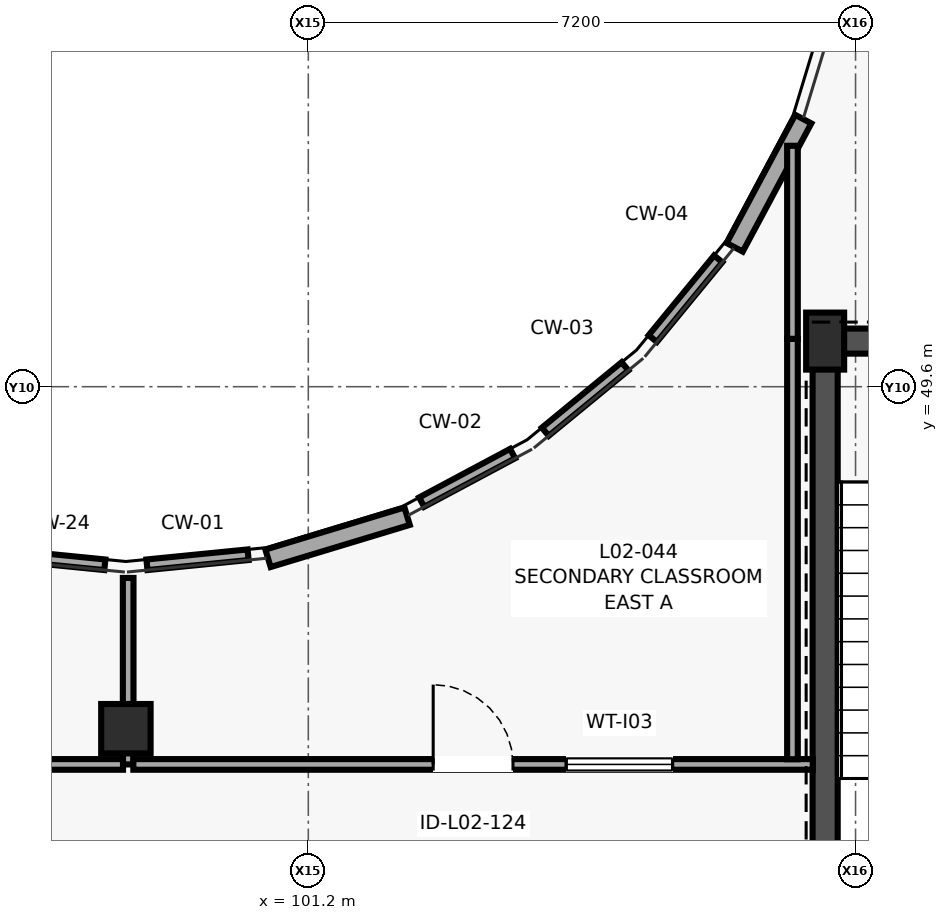
"""IFC4 building model, lengths in metres.
Left out: names, types, materials, properties, quantities, classifications, styles, units other than length and angle.
Written with IfcOpenShell. Run it as: python <this file> out.ifc"""

import sys

from ifc_helpers import new_model, si_unit, direction, frame, frame_2d, origin, origin_2d, place, context, subcontext, project, spatial, rectangle, circle, extrude, element, fill, save


model = new_model("IFC4")
c1 = context("Model", 3, precision=1e-05, world=origin(), true_north=direction((0.0, 1.0)))
c2 = subcontext(c1, "Body", "Model", "MODEL_VIEW")
j1 = project(units=[si_unit("LENGTHUNIT", "METRE"), si_unit("PLANEANGLEUNIT", "RADIAN")], contexts=[c1])
p1 = place(None, origin())
s1 = spatial("IfcSite", under=j1, at=p1, CompositionType="ELEMENT")
p2 = place(p1, origin())
s2 = spatial("IfcBuilding", under=s1, at=p2, CompositionType="ELEMENT")
p3 = place(p2, frame((0.0, 0.0, 8.2)))
s3 = spatial("IfcBuildingStorey", under=s2, at=p3, CompositionType="ELEMENT", Elevation=8.2)
p4 = place(p3, frame((98.8, 45.1, 0.0), z_axis=(0.0, 0.0, 1.0), x_axis=(1.0, 0.0, 0.0)))
e1 = element("IfcColumn", 1, at=p4, inside=s3, PredefinedType="COLUMN", context=c2, shape_type="SweptSolid", body=[
    extrude(circle(Radius=0.325, at=origin_2d()), origin(), (0.0, 0.0, 1.0), 4.0),
])
p5 = place(p3, frame((108.0, 50.2, 0.0), z_axis=(0.0, 0.0, 1.0), x_axis=(1.0, 0.0, 0.0)))
e2 = element("IfcColumn", 2, at=p5, inside=s3, PredefinedType="COLUMN", context=c2, shape_type="SweptSolid", body=[
    extrude(rectangle(XDim=0.5, YDim=0.75, at=origin_2d()), origin(), (0.0, 0.0, 1.0), 4.0),
])
p6 = place(p3, frame((100.67, 47.342, 0.0), z_axis=(0.0, 0.0, 1.0), x_axis=(0.957113490504, 0.289713248393, 0.0)))
e3 = element("IfcWall", 3, at=p6, inside=s3, PredefinedType="SOLIDWALL", context=c2, shape_type="SweptSolid", body=[
    extrude(rectangle(XDim=1.912, YDim=0.24, at=frame_2d((0.956, 0.0))), origin(), (0.0, 0.0, 1.0), 3.78),
])
p7 = place(p3, frame((106.81, 51.434, 0.0), z_axis=(0.0, 0.0, 1.0), x_axis=(0.471449153109, 0.881893245259, 0.0)))
e4 = element("IfcWall", 4, at=p7, inside=s3, PredefinedType="SOLIDWALL", context=c2, shape_type="SweptSolid", body=[
    extrude(rectangle(XDim=1.913, YDim=0.24, at=frame_2d((0.957, 0.0))), origin(), (0.0, 0.0, 1.0), 3.78),
])
p8 = place(p3, frame((107.835, 50.2, 0.0), z_axis=(0.0, 0.0, 1.0), x_axis=(1.0, 0.0, 0.0)))
e5 = element("IfcWall", 5, at=p8, inside=s3, PredefinedType="SHEAR", context=c2, shape_type="SweptSolid", body=[
    extrude(rectangle(XDim=7.53, YDim=0.33, at=frame_2d((3.765, 0.0))), origin(), (0.0, 0.0, 1.0), 3.78),
])
p9 = place(p8, frame((5.015, 0.0, 0.0)))
e6 = element("IfcOpeningElement", 6, at=p9, cuts=e5, PredefinedType="OPENING", context=c2, shape_type="SweptSolid", body=[
    extrude(rectangle(XDim=1.05, YDim=2.15, at=frame_2d((0.525, 1.075))), frame((0.0, 0.175, 0.0), z_axis=(0.0, -1.0, 0.0), x_axis=(1.0, 0.0, 0.0)), (0.0, 0.0, 1.0), 0.35),
])
p10 = place(p8, frame((1.565, 0.0, 0.0)))
e7 = element("IfcOpeningElement", 7, at=p10, cuts=e5, PredefinedType="OPENING", context=c2, shape_type="SweptSolid", body=[
    extrude(rectangle(XDim=1.1, YDim=2.15, at=frame_2d((0.55, 1.075))), frame((0.0, 0.175, 0.0), z_axis=(0.0, -1.0, 0.0), x_axis=(1.0, 0.0, 0.0)), (0.0, 0.0, 1.0), 0.35),
])
p11 = place(p3, frame((108.0, 42.565, 0.0), z_axis=(0.0, 0.0, 1.0), x_axis=(0.0, 1.0, 0.0)))
e8 = element("IfcWall", 8, at=p11, inside=s3, PredefinedType="SHEAR", context=c2, shape_type="SweptSolid", body=[
    extrude(rectangle(XDim=7.47, YDim=0.33, at=frame_2d((3.735, 0.0))), origin(), (0.0, 0.0, 1.0), 3.78),
])
p12 = place(p3, frame((103.888, 48.72, 0.0), z_axis=(0.0, 0.0, 1.0), x_axis=(-0.882198489785, -0.470877717269, 0.0)))
e9 = element("IfcWall", 9, at=p12, inside=s3, PredefinedType="PARTITIONING", context=c2, shape_type="SweptSolid", body=[
    extrude(rectangle(XDim=1.357, YDim=0.14, at=frame_2d((0.678, 0.0))), origin(), (0.0, 0.0, 1.0), 3.775),
])
p13 = place(p3, frame((100.408, 47.389, 0.0), z_axis=(0.0, 0.0, 1.0), x_axis=(-0.99513072014, -0.098563937798, 0.0)))
e10 = element("IfcWall", 10, at=p13, inside=s3, PredefinedType="PARTITIONING", context=c2, shape_type="SweptSolid", body=[
    extrude(rectangle(XDim=1.338, YDim=0.14, at=frame_2d((0.669, 0.0))), origin(), (0.0, 0.0, 1.0), 3.775),
])
p14 = place(p3, frame((98.83, 47.084, 0.0), z_axis=(0.0, 0.0, 1.0), x_axis=(0.0, -1.0, 0.0)))
e11 = element("IfcWall", 11, at=p14, inside=s3, PredefinedType="PARTITIONING", context=c2, shape_type="SweptSolid", body=[
    extrude(rectangle(XDim=2.454, YDim=0.14, at=frame_2d((1.227, 0.0))), origin(), (0.0, 0.0, 1.0), 3.775),
])
p15 = place(p3, frame((98.898, 44.63, 0.0), z_axis=(0.0, 0.0, 1.0), x_axis=(1.0, 0.0, 0.0)))
e12 = element("IfcWall", 12, at=p15, inside=s3, PredefinedType="PARTITIONING", context=c2, shape_type="SweptSolid", body=[
    extrude(rectangle(XDim=8.939, YDim=0.14, at=frame_2d((4.469, 0.0))), origin(), (0.0, 0.0, 1.0), 3.775),
])
p16 = place(p15, frame((3.945, 0.0, 0.0)))
e13 = element("IfcOpeningElement", 13, at=p16, cuts=e12, PredefinedType="OPENING", context=c2, shape_type="SweptSolid", body=[
    extrude(rectangle(XDim=1.05, YDim=2.1, at=frame_2d((0.525, 1.05))), frame((0.0, 0.08, 0.0), z_axis=(0.0, -1.0, 0.0), x_axis=(1.0, 0.0, 0.0)), (0.0, 0.0, 1.0), 0.16),
])
p17 = place(p15, frame((5.695, 0.0, 1.05)))
e14 = element("IfcOpeningElement", 14, at=p17, cuts=e12, PredefinedType="OPENING", context=c2, shape_type="SweptSolid", body=[
    extrude(rectangle(XDim=1.4, YDim=1.05, at=frame_2d((0.7, 0.525))), frame((0.0, 0.08, 0.0), z_axis=(0.0, -1.0, 0.0), x_axis=(1.0, 0.0, 0.0)), (0.0, 0.0, 1.0), 0.16),
])
p18 = place(p3, frame((107.57, 44.698, 0.0), z_axis=(0.0, 0.0, 1.0), x_axis=(0.0, 1.0, 0.0)))
e15 = element("IfcWall", 15, at=p18, inside=s3, PredefinedType="PARTITIONING", context=c2, shape_type="SweptSolid", body=[
    extrude(rectangle(XDim=5.532, YDim=0.14, at=frame_2d((2.766, 0.0))), origin(), (0.0, 0.0, 1.0), 3.775),
])
p19 = place(p3, frame((107.57, 50.23, 0.0), z_axis=(0.0, 0.0, 1.0), x_axis=(0.0, 1.0, 0.0)))
e16 = element("IfcWall", 16, at=p19, inside=s3, PredefinedType="PARTITIONING", context=c2, shape_type="SweptSolid", body=[
    extrude(rectangle(XDim=2.54, YDim=0.14, at=frame_2d((1.27, 0.0))), origin(), (0.0, 0.0, 1.0), 3.775),
])
p20 = place(p3, frame((106.593, 51.282, 0.0), z_axis=(0.0, 0.0, 1.0), x_axis=(-0.634451674201, -0.772962530207, 0.0)))
e17 = element("IfcWall", 17, at=p20, inside=s3, PredefinedType="PARTITIONING", context=c2, shape_type="SweptSolid", body=[
    extrude(rectangle(XDim=1.357, YDim=0.14, at=frame_2d((0.679, 0.0))), origin(), (0.0, 0.0, 1.0), 3.775),
])
p21 = place(p3, frame((105.367, 49.868, 0.0), z_axis=(0.0, 0.0, 1.0), x_axis=(-0.772978341916, -0.634432410055, 0.0)))
e18 = element("IfcWall", 18, at=p21, inside=s3, PredefinedType="PARTITIONING", context=c2, shape_type="SweptSolid", body=[
    extrude(rectangle(XDim=1.357, YDim=0.14, at=frame_2d((0.678, 0.0))), origin(), (0.0, 0.0, 1.0), 3.775),
])
p22 = place(p3, frame((88.03, 44.63, 0.0), z_axis=(0.0, 0.0, 1.0), x_axis=(1.0, 0.0, 0.0)))
e19 = element("IfcWall", 19, at=p22, inside=s3, PredefinedType="PARTITIONING", context=c2, shape_type="SweptSolid", body=[
    extrude(rectangle(XDim=10.732, YDim=0.14, at=frame_2d((5.366, 0.0))), origin(), (0.0, 0.0, 1.0), 3.775),
])
p23 = place(p22, frame((4.856, 0.0, 0.0)))
e20 = element("IfcOpeningElement", 20, at=p23, cuts=e19, PredefinedType="OPENING", context=c2, shape_type="SweptSolid", body=[
    extrude(rectangle(XDim=1.02, YDim=2.14, at=frame_2d((0.51, 1.07))), frame((0.0, 0.08, 0.0), z_axis=(0.0, -1.0, 0.0), x_axis=(1.0, 0.0, 0.0)), (0.0, 0.0, 1.0), 0.16),
])
p24 = place(p22, frame((6.576, 0.0, 1.05)))
e21 = element("IfcOpeningElement", 21, at=p24, cuts=e19, PredefinedType="OPENING", context=c2, shape_type="SweptSolid", body=[
    extrude(rectangle(XDim=1.8, YDim=1.2, at=frame_2d((0.9, 0.6))), frame((0.0, 0.08, 0.0), z_axis=(0.0, -1.0, 0.0), x_axis=(1.0, 0.0, 0.0)), (0.0, 0.0, 1.0), 0.16),
])
p25 = place(p3, frame((98.523, 47.257, 0.0), z_axis=(0.0, 0.0, 1.0), x_axis=(-0.99513072014, 0.098563937798, 0.0)))
e22 = element("IfcWall", 22, at=p25, inside=s3, PredefinedType="PARTITIONING", context=c2, shape_type="SweptSolid", body=[
    extrude(rectangle(XDim=1.338, YDim=0.14, at=frame_2d((0.669, 0.0))), origin(), (0.0, 0.0, 1.0), 3.775),
])
p26 = place(p16, origin())
e23 = element("IfcDoor", 23, at=p26, inside=s3, OperationType="SINGLE_SWING_LEFT", PredefinedType="DOOR", context=c2, shape_type="SweptSolid", body=[
    extrude(rectangle(XDim=1.05, YDim=2.1, at=frame_2d((0.525, 1.05))), frame((0.0, 0.025, 0.0), z_axis=(0.0, -1.0, 0.0), x_axis=(1.0, 0.0, 0.0)), (0.0, 0.0, 1.0), 0.05),
])
fill(e13, e23)
p27 = place(p17, origin())
e24 = element("IfcWindow", 24, at=p27, inside=s3, PartitioningType="SINGLE_PANEL", PredefinedType="WINDOW", context=c2, shape_type="SweptSolid", body=[
    extrude(rectangle(XDim=1.4, YDim=1.05, at=frame_2d((0.7, 0.525))), frame((0.0, 0.03, 0.0), z_axis=(0.0, -1.0, 0.0), x_axis=(1.0, 0.0, 0.0)), (0.0, 0.0, 1.0), 0.06),
])
fill(e14, e24)
save(model, sys.argv[1])
